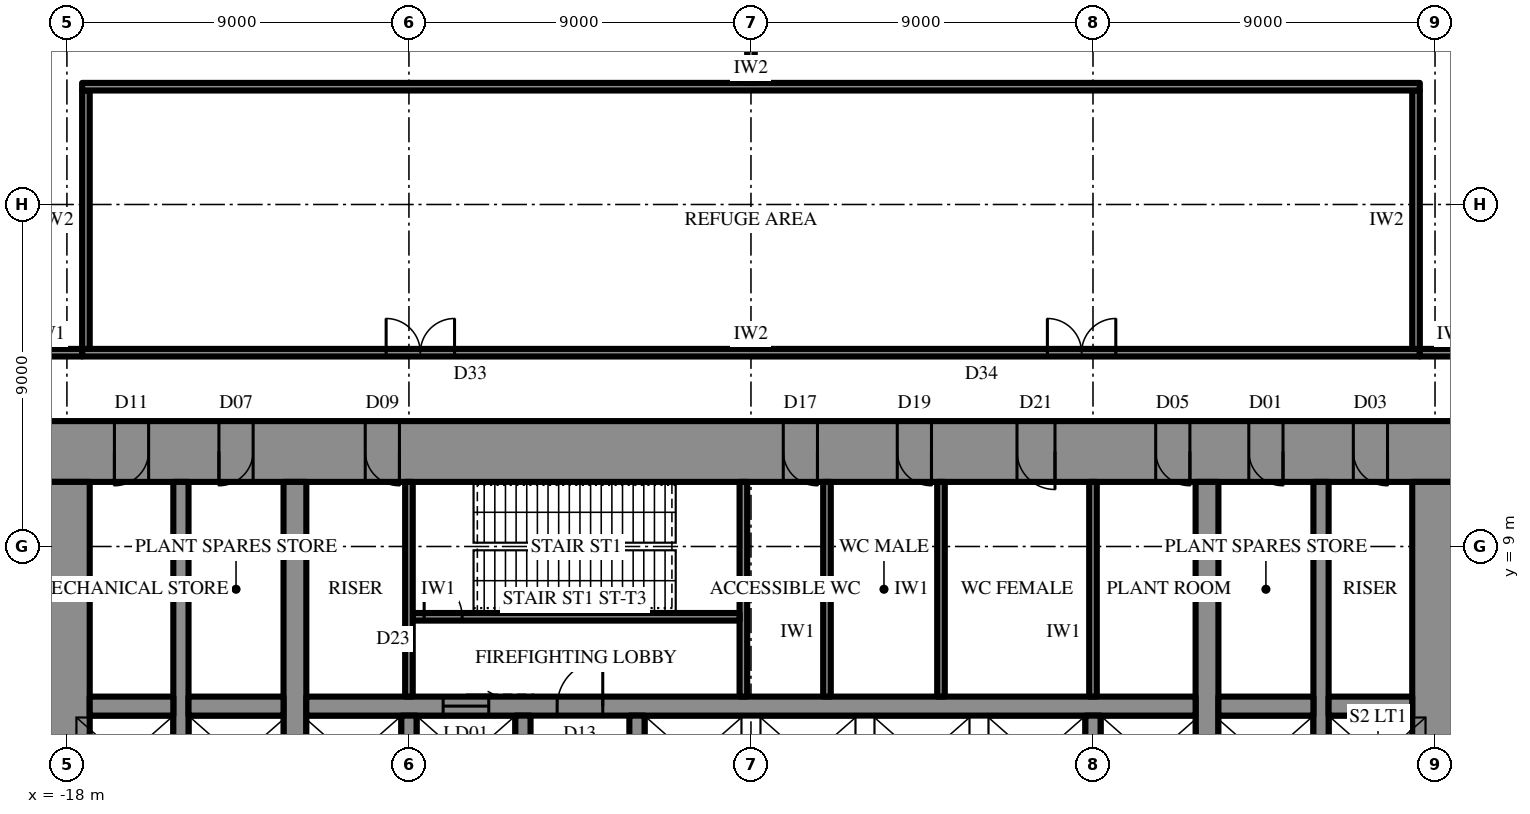
"""IFC4 building model, lengths in metres.
Left out: names, types, materials, properties, quantities, classifications, styles, units other than length and angle.
Written with IfcOpenShell. Run it as: python <this file> out.ifc"""

import sys

from ifc_helpers import new_model, si_unit, direction, frame, frame_2d, origin, place, context, subcontext, project, spatial, rectangle, extrude, element, fill, save


model = new_model("IFC4")
c1 = context("Model", 3, precision=1e-05, world=origin(), true_north=direction((0.0, 1.0)))
c2 = subcontext(c1, "Body", "Model", "MODEL_VIEW")
j1 = project(units=[si_unit("LENGTHUNIT", "METRE"), si_unit("PLANEANGLEUNIT", "RADIAN")], contexts=[c1])
p1 = place(None, origin())
s1 = spatial("IfcSite", under=j1, at=p1, CompositionType="ELEMENT")
p2 = place(p1, origin())
s2 = spatial("IfcBuilding", under=s1, at=p2, CompositionType="ELEMENT")
p3 = place(p2, frame((0.0, 0.0, 107.5)))
s3 = spatial("IfcBuildingStorey", under=s2, at=p3, CompositionType="ELEMENT", Elevation=107.5)
p4 = place(p3, frame((-18.6, 11.5, 0.0), z_axis=(0.0, 0.0, 1.0), x_axis=(1.0, 0.0, 0.0)))
e1 = element("IfcWall", 1, at=p4, inside=s3, PredefinedType="SHEAR", context=c2, shape_type="SweptSolid", body=[
    extrude(rectangle(XDim=37.2, YDim=1.6, at=frame_2d((18.6, 0.0))), origin(), (0.0, 0.0, 1.0), 7.0),
])
p5 = place(p4, frame((19.45, 0.0, 0.0)))
e2 = element("IfcOpeningElement", 2, at=p5, cuts=e1, PredefinedType="OPENING", context=c2, shape_type="SweptSolid", body=[
    extrude(rectangle(XDim=0.9, YDim=2.2, at=frame_2d((0.45, 1.1))), frame((0.0, 0.81, 0.0), z_axis=(0.0, -1.0, 0.0), x_axis=(1.0, 0.0, 0.0)), (0.0, 0.0, 1.0), 1.62),
])
p6 = place(p4, frame((22.45, 0.0, 0.0)))
e3 = element("IfcOpeningElement", 3, at=p6, cuts=e1, PredefinedType="OPENING", context=c2, shape_type="SweptSolid", body=[
    extrude(rectangle(XDim=0.9, YDim=2.2, at=frame_2d((0.45, 1.1))), frame((0.0, 0.81, 0.0), z_axis=(0.0, -1.0, 0.0), x_axis=(1.0, 0.0, 0.0)), (0.0, 0.0, 1.0), 1.62),
])
p7 = place(p4, frame((25.6, 0.0, 0.0)))
e4 = element("IfcOpeningElement", 4, at=p7, cuts=e1, PredefinedType="OPENING", context=c2, shape_type="SweptSolid", body=[
    extrude(rectangle(XDim=1.0, YDim=2.2, at=frame_2d((0.5, 1.1))), frame((0.0, 0.81, 0.0), z_axis=(0.0, -1.0, 0.0), x_axis=(1.0, 0.0, 0.0)), (0.0, 0.0, 1.0), 1.62),
])
p8 = place(p4, frame((1.85, 0.0, 0.0)))
e5 = element("IfcOpeningElement", 5, at=p8, cuts=e1, PredefinedType="OPENING", context=c2, shape_type="SweptSolid", body=[
    extrude(rectangle(XDim=0.9, YDim=2.2, at=frame_2d((0.45, 1.1))), frame((0.0, 0.81, 0.0), z_axis=(0.0, -1.0, 0.0), x_axis=(1.0, 0.0, 0.0)), (0.0, 0.0, 1.0), 1.62),
])
p9 = place(p4, frame((4.6, 0.0, 0.0)))
e6 = element("IfcOpeningElement", 6, at=p9, cuts=e1, PredefinedType="OPENING", context=c2, shape_type="SweptSolid", body=[
    extrude(rectangle(XDim=0.9, YDim=2.2, at=frame_2d((0.45, 1.1))), frame((0.0, 0.81, 0.0), z_axis=(0.0, -1.0, 0.0), x_axis=(1.0, 0.0, 0.0)), (0.0, 0.0, 1.0), 1.62),
])
p10 = place(p4, frame((8.45, 0.0, 0.0)))
e7 = element("IfcOpeningElement", 7, at=p10, cuts=e1, PredefinedType="OPENING", context=c2, shape_type="SweptSolid", body=[
    extrude(rectangle(XDim=0.9, YDim=2.2, at=frame_2d((0.45, 1.1))), frame((0.0, 0.81, 0.0), z_axis=(0.0, -1.0, 0.0), x_axis=(1.0, 0.0, 0.0)), (0.0, 0.0, 1.0), 1.62),
])
p11 = place(p4, frame((29.25, 0.0, 0.0)))
e8 = element("IfcOpeningElement", 8, at=p11, cuts=e1, PredefinedType="OPENING", context=c2, shape_type="SweptSolid", body=[
    extrude(rectangle(XDim=0.9, YDim=2.2, at=frame_2d((0.45, 1.1))), frame((0.0, 0.81, 0.0), z_axis=(0.0, -1.0, 0.0), x_axis=(1.0, 0.0, 0.0)), (0.0, 0.0, 1.0), 1.62),
])
p12 = place(p4, frame((31.7, 0.0, 0.0)))
e9 = element("IfcOpeningElement", 9, at=p12, cuts=e1, PredefinedType="OPENING", context=c2, shape_type="SweptSolid", body=[
    extrude(rectangle(XDim=0.9, YDim=2.2, at=frame_2d((0.45, 1.1))), frame((0.0, 0.81, 0.0), z_axis=(0.0, -1.0, 0.0), x_axis=(1.0, 0.0, 0.0)), (0.0, 0.0, 1.0), 1.62),
])
p13 = place(p4, frame((34.45, 0.0, 0.0)))
e10 = element("IfcOpeningElement", 10, at=p13, cuts=e1, PredefinedType="OPENING", context=c2, shape_type="SweptSolid", body=[
    extrude(rectangle(XDim=0.9, YDim=2.2, at=frame_2d((0.45, 1.1))), frame((0.0, 0.81, 0.0), z_axis=(0.0, -1.0, 0.0), x_axis=(1.0, 0.0, 0.0)), (0.0, 0.0, 1.0), 1.62),
])
p14 = place(p3, frame((18.0, -10.7, 0.0), z_axis=(0.0, 0.0, 1.0), x_axis=(0.0, 1.0, 0.0)))
e11 = element("IfcWall", 11, at=p14, inside=s3, PredefinedType="SHEAR", context=c2, shape_type="SweptSolid", body=[
    extrude(rectangle(XDim=21.4, YDim=1.2, at=frame_2d((10.7, 0.0))), origin(), (0.0, 0.0, 1.0), 7.0),
])
p15 = place(p14, frame((9.8, 0.0, 0.0)))
e12 = element("IfcOpeningElement", 12, at=p15, cuts=e11, PredefinedType="OPENING", context=c2, shape_type="SweptSolid", body=[
    extrude(rectangle(XDim=1.8, YDim=2.4, at=frame_2d((0.9, 1.2))), frame((0.0, 0.61, 0.0), z_axis=(0.0, -1.0, 0.0), x_axis=(1.0, 0.0, 0.0)), (0.0, 0.0, 1.0), 1.22),
])
p16 = place(p3, frame((-18.0, 10.7, 0.0), z_axis=(0.0, 0.0, 1.0), x_axis=(0.0, -1.0, 0.0)))
e13 = element("IfcWall", 13, at=p16, inside=s3, PredefinedType="SHEAR", context=c2, shape_type="SweptSolid", body=[
    extrude(rectangle(XDim=21.4, YDim=1.2, at=frame_2d((10.7, 0.0))), origin(), (0.0, 0.0, 1.0), 7.0),
])
p17 = place(p16, frame((9.8, 0.0, 0.0)))
e14 = element("IfcOpeningElement", 14, at=p17, cuts=e13, PredefinedType="OPENING", context=c2, shape_type="SweptSolid", body=[
    extrude(rectangle(XDim=1.8, YDim=2.4, at=frame_2d((0.9, 1.2))), frame((0.0, 0.61, 0.0), z_axis=(0.0, -1.0, 0.0), x_axis=(1.0, 0.0, 0.0)), (0.0, 0.0, 1.0), 1.22),
])
p18 = place(p3, frame((12.0, -10.7, 0.0), z_axis=(0.0, 0.0, 1.0), x_axis=(0.0, 1.0, 0.0)))
e15 = element("IfcWall", 15, at=p18, inside=s3, PredefinedType="SHEAR", context=c2, shape_type="SweptSolid", body=[
    extrude(rectangle(XDim=21.4, YDim=0.6, at=frame_2d((10.7, 0.0))), origin(), (0.0, 0.0, 1.0), 7.0),
])
p19 = place(p18, frame((9.8, 0.0, 0.0)))
e16 = element("IfcOpeningElement", 16, at=p19, cuts=e15, PredefinedType="OPENING", context=c2, shape_type="SweptSolid", body=[
    extrude(rectangle(XDim=1.8, YDim=2.4, at=frame_2d((0.9, 1.2))), frame((0.0, 0.31, 0.0), z_axis=(0.0, -1.0, 0.0), x_axis=(1.0, 0.0, 0.0)), (0.0, 0.0, 1.0), 0.62),
])
p20 = place(p3, frame((-12.0, -10.7, 0.0), z_axis=(0.0, 0.0, 1.0), x_axis=(0.0, 1.0, 0.0)))
e17 = element("IfcWall", 17, at=p20, inside=s3, PredefinedType="SHEAR", context=c2, shape_type="SweptSolid", body=[
    extrude(rectangle(XDim=21.4, YDim=0.6, at=frame_2d((10.7, 0.0))), origin(), (0.0, 0.0, 1.0), 7.0),
])
p21 = place(p20, frame((9.8, 0.0, 0.0)))
e18 = element("IfcOpeningElement", 18, at=p21, cuts=e17, PredefinedType="OPENING", context=c2, shape_type="SweptSolid", body=[
    extrude(rectangle(XDim=1.8, YDim=2.4, at=frame_2d((0.9, 1.2))), frame((0.0, 0.31, 0.0), z_axis=(0.0, -1.0, 0.0), x_axis=(1.0, 0.0, 0.0)), (0.0, 0.0, 1.0), 0.62),
])
p22 = place(p3, frame((15.0, -10.7, 0.0), z_axis=(0.0, 0.0, 1.0), x_axis=(0.0, 1.0, 0.0)))
e19 = element("IfcWall", 19, at=p22, inside=s3, PredefinedType="SHEAR", context=c2, shape_type="SweptSolid", body=[
    extrude(rectangle(XDim=21.4, YDim=0.4, at=frame_2d((10.7, 0.0))), origin(), (0.0, 0.0, 1.0), 7.0),
])
p23 = place(p22, frame((9.8, 0.0, 0.0)))
e20 = element("IfcOpeningElement", 20, at=p23, cuts=e19, PredefinedType="OPENING", context=c2, shape_type="SweptSolid", body=[
    extrude(rectangle(XDim=1.8, YDim=2.4, at=frame_2d((0.9, 1.2))), frame((0.0, 0.21, 0.0), z_axis=(0.0, -1.0, 0.0), x_axis=(1.0, 0.0, 0.0)), (0.0, 0.0, 1.0), 0.42),
])
p24 = place(p3, frame((-15.0, -10.7, 0.0), z_axis=(0.0, 0.0, 1.0), x_axis=(0.0, 1.0, 0.0)))
e21 = element("IfcWall", 21, at=p24, inside=s3, PredefinedType="SHEAR", context=c2, shape_type="SweptSolid", body=[
    extrude(rectangle(XDim=21.4, YDim=0.4, at=frame_2d((10.7, 0.0))), origin(), (0.0, 0.0, 1.0), 7.0),
])
p25 = place(p24, frame((9.8, 0.0, 0.0)))
e22 = element("IfcOpeningElement", 22, at=p25, cuts=e21, PredefinedType="OPENING", context=c2, shape_type="SweptSolid", body=[
    extrude(rectangle(XDim=1.8, YDim=2.4, at=frame_2d((0.9, 1.2))), frame((0.0, 0.21, 0.0), z_axis=(0.0, -1.0, 0.0), x_axis=(1.0, 0.0, 0.0)), (0.0, 0.0, 1.0), 0.42),
])
p26 = place(p3, frame((-17.4, 4.8, 0.0), z_axis=(0.0, 0.0, 1.0), x_axis=(1.0, 0.0, 0.0)))
e23 = element("IfcWall", 23, at=p26, inside=s3, PredefinedType="SHEAR", context=c2, shape_type="SweptSolid", body=[
    extrude(rectangle(XDim=2.2, YDim=0.5, at=frame_2d((1.1, 0.0))), origin(), (0.0, 0.0, 1.0), 7.0),
])
p27 = place(p3, frame((-14.8, 4.8, 0.0), z_axis=(0.0, 0.0, 1.0), x_axis=(1.0, 0.0, 0.0)))
e24 = element("IfcWall", 24, at=p27, inside=s3, PredefinedType="SHEAR", context=c2, shape_type="SweptSolid", body=[
    extrude(rectangle(XDim=2.5, YDim=0.5, at=frame_2d((1.25, 0.0))), origin(), (0.0, 0.0, 1.0), 7.0),
])
p28 = place(p3, frame((-11.7, 4.8, 0.0), z_axis=(0.0, 0.0, 1.0), x_axis=(1.0, 0.0, 0.0)))
e25 = element("IfcWall", 25, at=p28, inside=s3, PredefinedType="SHEAR", context=c2, shape_type="SweptSolid", body=[
    extrude(rectangle(XDim=23.4, YDim=0.5, at=frame_2d((11.7, 0.0))), origin(), (0.0, 0.0, 1.0), 7.0),
])
p29 = place(p28, frame((6.6, 0.0, 0.0)))
e26 = element("IfcOpeningElement", 26, at=p29, cuts=e25, PredefinedType="OPENING", context=c2, shape_type="SweptSolid", body=[
    extrude(rectangle(XDim=1.2, YDim=2.2, at=frame_2d((0.6, 1.1))), frame((0.0, 0.26, 0.0), z_axis=(0.0, -1.0, 0.0), x_axis=(1.0, 0.0, 0.0)), (0.0, 0.0, 1.0), 0.52),
])
p30 = place(p28, frame((3.6, 0.0, 0.0)))
e27 = element("IfcOpeningElement", 27, at=p30, cuts=e25, PredefinedType="OPENING", context=c2, shape_type="SweptSolid", body=[
    extrude(rectangle(XDim=1.2, YDim=2.2, at=frame_2d((0.6, 1.1))), frame((0.0, 0.26, 0.0), z_axis=(0.0, -1.0, 0.0), x_axis=(1.0, 0.0, 0.0)), (0.0, 0.0, 1.0), 0.52),
])
p31 = place(p3, frame((12.3, 4.8, 0.0), z_axis=(0.0, 0.0, 1.0), x_axis=(1.0, 0.0, 0.0)))
e28 = element("IfcWall", 28, at=p31, inside=s3, PredefinedType="SHEAR", context=c2, shape_type="SweptSolid", body=[
    extrude(rectangle(XDim=2.5, YDim=0.5, at=frame_2d((1.25, 0.0))), origin(), (0.0, 0.0, 1.0), 7.0),
])
p32 = place(p3, frame((15.2, 4.8, 0.0), z_axis=(0.0, 0.0, 1.0), x_axis=(1.0, 0.0, 0.0)))
e29 = element("IfcWall", 29, at=p32, inside=s3, PredefinedType="SHEAR", context=c2, shape_type="SweptSolid", body=[
    extrude(rectangle(XDim=2.2, YDim=0.5, at=frame_2d((1.1, 0.0))), origin(), (0.0, 0.0, 1.0), 7.0),
])
for number, where, z_axis, x_axis in (
    (30, (-9.0, 2.25, 0.0), (0.0, 0.0, 1.0), (0.0, 1.0, 0.0)),
    (31, (-6.0, 2.25, 0.0), (0.0, 0.0, 1.0), (0.0, 1.0, 0.0)),
    (32, (-3.0, 2.25, 0.0), (0.0, 0.0, 1.0), (0.0, 1.0, 0.0)),
    (33, (9.0, 2.25, 0.0), (0.0, 0.0, 1.0), (0.0, 1.0, 0.0)),
):
    element("IfcWall", number, at=place(p3, frame(where, z_axis=z_axis, x_axis=x_axis)), inside=s3, PredefinedType="SHEAR", context=c2, shape_type="SweptSolid", body=[
        extrude(rectangle(XDim=2.3, YDim=0.4, at=frame_2d((1.15, 0.0))), origin(), (0.0, 0.0, 1.0), 7.0),
    ])
p33 = place(p3, frame((-0.2, 5.05, 0.0), z_axis=(0.0, 0.0, 1.0), x_axis=(0.0, 1.0, 0.0)))
e34 = element("IfcWall", 34, at=p33, inside=s3, PredefinedType="SHEAR", context=c2, shape_type="SweptSolid", body=[
    extrude(rectangle(XDim=5.65, YDim=0.2, at=frame_2d((2.825, 0.0))), origin(), (0.0, 0.0, 1.0), 7.0),
])
p34 = place(p3, frame((-8.9, 7.15, 0.0), z_axis=(0.0, 0.0, 1.0), x_axis=(1.0, 0.0, 0.0)))
e35 = element("IfcWall", 35, at=p34, inside=s3, PredefinedType="SHEAR", context=c2, shape_type="SweptSolid", body=[
    extrude(rectangle(XDim=8.6, YDim=0.2, at=frame_2d((4.3, 0.0))), origin(), (0.0, 0.0, 1.0), 7.0),
])
p35 = place(p34, frame((0.3, 0.0, 0.0)))
e36 = element("IfcOpeningElement", 36, at=p35, cuts=e35, PredefinedType="OPENING", context=c2, shape_type="SweptSolid", body=[
    extrude(rectangle(XDim=1.0, YDim=2.2, at=frame_2d((0.5, 1.1))), frame((0.0, 0.11, 0.0), z_axis=(0.0, -1.0, 0.0), x_axis=(1.0, 0.0, 0.0)), (0.0, 0.0, 1.0), 0.22),
])
for number, where, z_axis, x_axis in (
    (37, (-9.0, 5.05, 0.0), (0.0, 0.0, 1.0), (0.0, 1.0, 0.0)),
    (38, (9.0, 5.05, 0.0), (0.0, 0.0, 1.0), (0.0, 1.0, 0.0)),
    (39, (2.0, 5.05, 0.0), (0.0, 0.0, 1.0), (0.0, 1.0, 0.0)),
    (40, (5.0, 5.05, 0.0), (0.0, 0.0, 1.0), (0.0, 1.0, 0.0)),
):
    element("IfcWall", number, at=place(p3, frame(where, z_axis=z_axis, x_axis=x_axis)), inside=s3, PredefinedType="PARTITIONING", context=c2, shape_type="SweptSolid", body=[
        extrude(rectangle(XDim=5.65, YDim=0.2, at=frame_2d((2.825, 0.0))), origin(), (0.0, 0.0, 1.0), 6.7),
    ])
p36 = place(p3, frame((-17.6, 14.1, 0.0), z_axis=(0.0, 0.0, 1.0), x_axis=(1.0, 0.0, 0.0)))
e41 = element("IfcWall", 41, at=p36, inside=s3, PredefinedType="PARTITIONING", context=c2, shape_type="SweptSolid", body=[
    extrude(rectangle(XDim=35.2, YDim=0.2, at=frame_2d((17.6, 0.0))), origin(), (0.0, 0.0, 1.0), 6.7),
])
p37 = place(p36, frame((8.0, 0.0, 0.0)))
e42 = element("IfcOpeningElement", 42, at=p37, cuts=e41, PredefinedType="OPENING", context=c2, shape_type="SweptSolid", body=[
    extrude(rectangle(XDim=1.8, YDim=2.1, at=frame_2d((0.9, 1.05))), frame((0.0, 0.11, 0.0), z_axis=(0.0, -1.0, 0.0), x_axis=(1.0, 0.0, 0.0)), (0.0, 0.0, 1.0), 0.22),
])
p38 = place(p36, frame((25.4, 0.0, 0.0)))
e43 = element("IfcOpeningElement", 43, at=p38, cuts=e41, PredefinedType="OPENING", context=c2, shape_type="SweptSolid", body=[
    extrude(rectangle(XDim=1.8, YDim=2.1, at=frame_2d((0.9, 1.05))), frame((0.0, 0.11, 0.0), z_axis=(0.0, -1.0, 0.0), x_axis=(1.0, 0.0, 0.0)), (0.0, 0.0, 1.0), 0.22),
])
for number, where, z_axis, x_axis in (
    (44, (-17.5, 14.2, 0.0), (0.0, 0.0, 1.0), (0.0, 1.0, 0.0)),
    (45, (17.5, 14.2, 0.0), (0.0, 0.0, 1.0), (0.0, 1.0, 0.0)),
):
    element("IfcWall", number, at=place(p3, frame(where, z_axis=z_axis, x_axis=x_axis)), inside=s3, PredefinedType="PARTITIONING", context=c2, shape_type="SweptSolid", body=[
        extrude(rectangle(XDim=6.8, YDim=0.2, at=frame_2d((3.4, 0.0))), origin(), (0.0, 0.0, 1.0), 6.7),
    ])
p39 = place(p3, frame((-17.6, 21.1, 0.0), z_axis=(0.0, 0.0, 1.0), x_axis=(1.0, 0.0, 0.0)))
e46 = element("IfcWall", 46, at=p39, inside=s3, PredefinedType="PARTITIONING", context=c2, shape_type="SweptSolid", body=[
    extrude(rectangle(XDim=35.2, YDim=0.2, at=frame_2d((17.6, 0.0))), origin(), (0.0, 0.0, 1.0), 6.7),
])
for number, where, z_axis, x_axis in (
    (47, (-19.4, 14.1, 0.0), (0.0, 0.0, 1.0), (1.0, 0.0, 0.0)),
    (48, (17.6, 14.1, 0.0), (0.0, 0.0, 1.0), (1.0, 0.0, 0.0)),
):
    element("IfcWall", number, at=place(p3, frame(where, z_axis=z_axis, x_axis=x_axis)), inside=s3, PredefinedType="PARTITIONING", context=c2, shape_type="SweptSolid", body=[
        extrude(rectangle(XDim=1.8, YDim=0.2, at=frame_2d((0.9, 0.0))), origin(), (0.0, 0.0, 1.0), 6.7),
    ])
p40 = place(p3, frame((0.0, 21.2, 0.0), z_axis=(0.0, 0.0, 1.0), x_axis=(0.0, 1.0, 0.0)))
e49 = element("IfcWall", 49, at=p40, inside=s3, PredefinedType="PARTITIONING", context=c2, shape_type="SweptSolid", body=[
    extrude(rectangle(XDim=12.61, YDim=0.2, at=frame_2d((6.305, 0.0))), origin(), (0.0, 0.0, 1.0), 2.2),
])
p41 = place(p29, origin())
e50 = element("IfcDoor", 50, at=p41, inside=s3, OperationType="SINGLE_SWING_LEFT", PredefinedType="DOOR", context=c2, shape_type="SweptSolid", body=[
    extrude(rectangle(XDim=1.2, YDim=2.2, at=frame_2d((0.6, 1.1))), frame((0.0, 0.025, 0.0), z_axis=(0.0, -1.0, 0.0), x_axis=(1.0, 0.0, 0.0)), (0.0, 0.0, 1.0), 0.05),
])
fill(e26, e50)
p42 = place(p35, origin())
e51 = element("IfcDoor", 51, at=p42, inside=s3, OperationType="SINGLE_SWING_RIGHT", PredefinedType="DOOR", context=c2, shape_type="SweptSolid", body=[
    extrude(rectangle(XDim=1.0, YDim=2.2, at=frame_2d((0.5, 1.1))), frame((0.0, 0.025, 0.0), z_axis=(0.0, -1.0, 0.0), x_axis=(1.0, 0.0, 0.0)), (0.0, 0.0, 1.0), 0.05),
])
fill(e36, e51)
p43 = place(p5, frame((0.9, 0.0, 0.0), z_axis=(0.0, 0.0, 1.0), x_axis=(-1.0, 0.0, 0.0)))
e52 = element("IfcDoor", 52, at=p43, inside=s3, OperationType="SINGLE_SWING_RIGHT", PredefinedType="DOOR", context=c2, shape_type="SweptSolid", body=[
    extrude(rectangle(XDim=0.9, YDim=2.2, at=frame_2d((0.45, 1.1))), frame((0.0, 0.025, 0.0), z_axis=(0.0, -1.0, 0.0), x_axis=(1.0, 0.0, 0.0)), (0.0, 0.0, 1.0), 0.05),
])
fill(e2, e52)
p44 = place(p6, frame((0.9, 0.0, 0.0), z_axis=(0.0, 0.0, 1.0), x_axis=(-1.0, 0.0, 0.0)))
e53 = element("IfcDoor", 53, at=p44, inside=s3, OperationType="SINGLE_SWING_RIGHT", PredefinedType="DOOR", context=c2, shape_type="SweptSolid", body=[
    extrude(rectangle(XDim=0.9, YDim=2.2, at=frame_2d((0.45, 1.1))), frame((0.0, 0.025, 0.0), z_axis=(0.0, -1.0, 0.0), x_axis=(1.0, 0.0, 0.0)), (0.0, 0.0, 1.0), 0.05),
])
fill(e3, e53)
p45 = place(p7, frame((1.0, 0.0, 0.0), z_axis=(0.0, 0.0, 1.0), x_axis=(-1.0, 0.0, 0.0)))
e54 = element("IfcDoor", 54, at=p45, inside=s3, OperationType="SINGLE_SWING_RIGHT", PredefinedType="DOOR", context=c2, shape_type="SweptSolid", body=[
    extrude(rectangle(XDim=1.0, YDim=2.2, at=frame_2d((0.5, 1.1))), frame((0.0, 0.025, 0.0), z_axis=(0.0, -1.0, 0.0), x_axis=(1.0, 0.0, 0.0)), (0.0, 0.0, 1.0), 0.05),
])
fill(e4, e54)
p46 = place(p8, frame((0.9, 0.0, 0.0), z_axis=(0.0, 0.0, 1.0), x_axis=(-1.0, 0.0, 0.0)))
e55 = element("IfcDoor", 55, at=p46, inside=s3, OperationType="SINGLE_SWING_LEFT", PredefinedType="DOOR", context=c2, shape_type="SweptSolid", body=[
    extrude(rectangle(XDim=0.9, YDim=2.2, at=frame_2d((0.45, 1.1))), frame((0.0, 0.025, 0.0), z_axis=(0.0, -1.0, 0.0), x_axis=(1.0, 0.0, 0.0)), (0.0, 0.0, 1.0), 0.05),
])
fill(e5, e55)
p47 = place(p9, frame((0.9, 0.0, 0.0), z_axis=(0.0, 0.0, 1.0), x_axis=(-1.0, 0.0, 0.0)))
e56 = element("IfcDoor", 56, at=p47, inside=s3, OperationType="SINGLE_SWING_LEFT", PredefinedType="DOOR", context=c2, shape_type="SweptSolid", body=[
    extrude(rectangle(XDim=0.9, YDim=2.2, at=frame_2d((0.45, 1.1))), frame((0.0, 0.025, 0.0), z_axis=(0.0, -1.0, 0.0), x_axis=(1.0, 0.0, 0.0)), (0.0, 0.0, 1.0), 0.05),
])
fill(e6, e56)
p48 = place(p10, frame((0.9, 0.0, 0.0), z_axis=(0.0, 0.0, 1.0), x_axis=(-1.0, 0.0, 0.0)))
e57 = element("IfcDoor", 57, at=p48, inside=s3, OperationType="SINGLE_SWING_RIGHT", PredefinedType="DOOR", context=c2, shape_type="SweptSolid", body=[
    extrude(rectangle(XDim=0.9, YDim=2.2, at=frame_2d((0.45, 1.1))), frame((0.0, 0.025, 0.0), z_axis=(0.0, -1.0, 0.0), x_axis=(1.0, 0.0, 0.0)), (0.0, 0.0, 1.0), 0.05),
])
fill(e7, e57)
p49 = place(p11, frame((0.9, 0.0, 0.0), z_axis=(0.0, 0.0, 1.0), x_axis=(-1.0, 0.0, 0.0)))
e58 = element("IfcDoor", 58, at=p49, inside=s3, OperationType="SINGLE_SWING_RIGHT", PredefinedType="DOOR", context=c2, shape_type="SweptSolid", body=[
    extrude(rectangle(XDim=0.9, YDim=2.2, at=frame_2d((0.45, 1.1))), frame((0.0, 0.025, 0.0), z_axis=(0.0, -1.0, 0.0), x_axis=(1.0, 0.0, 0.0)), (0.0, 0.0, 1.0), 0.05),
])
fill(e8, e58)
p50 = place(p12, frame((0.9, 0.0, 0.0), z_axis=(0.0, 0.0, 1.0), x_axis=(-1.0, 0.0, 0.0)))
e59 = element("IfcDoor", 59, at=p50, inside=s3, OperationType="SINGLE_SWING_RIGHT", PredefinedType="DOOR", context=c2, shape_type="SweptSolid", body=[
    extrude(rectangle(XDim=0.9, YDim=2.2, at=frame_2d((0.45, 1.1))), frame((0.0, 0.025, 0.0), z_axis=(0.0, -1.0, 0.0), x_axis=(1.0, 0.0, 0.0)), (0.0, 0.0, 1.0), 0.05),
])
fill(e9, e59)
p51 = place(p13, frame((0.9, 0.0, 0.0), z_axis=(0.0, 0.0, 1.0), x_axis=(-1.0, 0.0, 0.0)))
e60 = element("IfcDoor", 60, at=p51, inside=s3, OperationType="SINGLE_SWING_RIGHT", PredefinedType="DOOR", context=c2, shape_type="SweptSolid", body=[
    extrude(rectangle(XDim=0.9, YDim=2.2, at=frame_2d((0.45, 1.1))), frame((0.0, 0.025, 0.0), z_axis=(0.0, -1.0, 0.0), x_axis=(1.0, 0.0, 0.0)), (0.0, 0.0, 1.0), 0.05),
])
fill(e10, e60)
p52 = place(p30, origin())
e61 = element("IfcDoor", 61, at=p52, inside=s3, OperationType="SLIDING_TO_LEFT", PredefinedType="DOOR", context=c2, shape_type="SweptSolid", body=[
    extrude(rectangle(XDim=1.2, YDim=2.2, at=frame_2d((0.6, 1.1))), frame((0.0, 0.025, 0.0), z_axis=(0.0, -1.0, 0.0), x_axis=(1.0, 0.0, 0.0)), (0.0, 0.0, 1.0), 0.05),
])
fill(e27, e61)
p53 = place(p37, origin())
e62 = element("IfcDoor", 62, at=p53, inside=s3, OperationType="DOUBLE_DOOR_SINGLE_SWING", PredefinedType="DOOR", context=c2, shape_type="SweptSolid", body=[
    extrude(rectangle(XDim=1.8, YDim=2.1, at=frame_2d((0.9, 1.05))), frame((0.0, 0.025, 0.0), z_axis=(0.0, -1.0, 0.0), x_axis=(1.0, 0.0, 0.0)), (0.0, 0.0, 1.0), 0.05),
])
fill(e42, e62)
p54 = place(p38, origin())
e63 = element("IfcDoor", 63, at=p54, inside=s3, OperationType="DOUBLE_DOOR_SINGLE_SWING", PredefinedType="DOOR", context=c2, shape_type="SweptSolid", body=[
    extrude(rectangle(XDim=1.8, YDim=2.1, at=frame_2d((0.9, 1.05))), frame((0.0, 0.025, 0.0), z_axis=(0.0, -1.0, 0.0), x_axis=(1.0, 0.0, 0.0)), (0.0, 0.0, 1.0), 0.05),
])
fill(e43, e63)
save(model, sys.argv[1])
